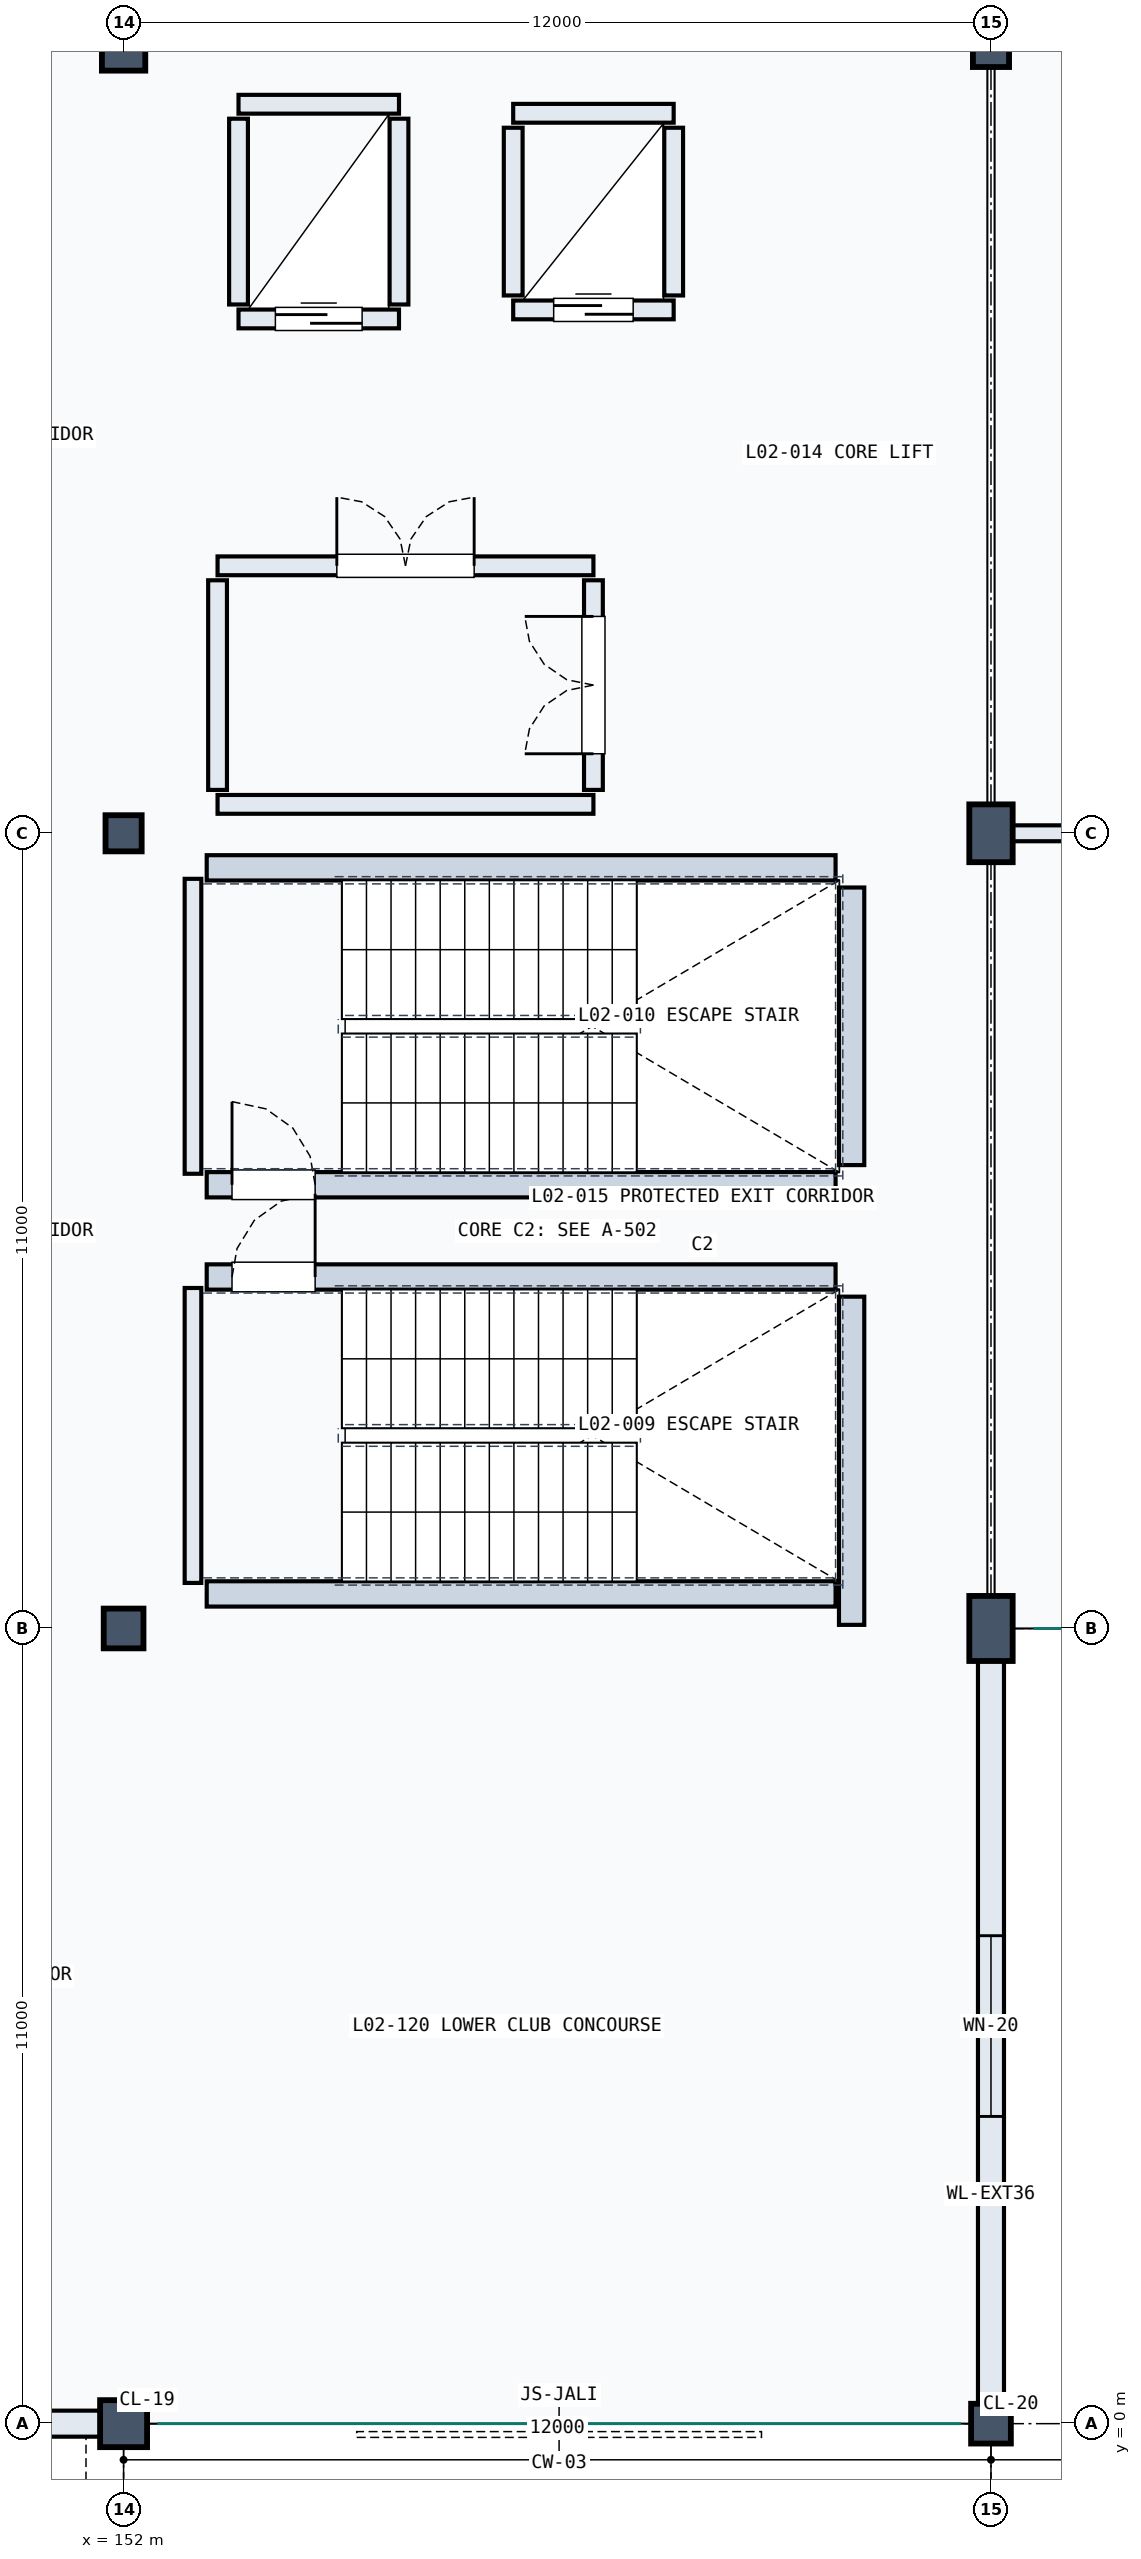
"""IFC4 building model, lengths in metres.
Left out: names, types, materials, properties, quantities, classifications, styles, units other than length and angle.
Written with IfcOpenShell. Run it as: python <this file> out.ifc"""

import sys

from ifc_helpers import new_model, si_unit, direction, frame, frame_2d, origin, origin_2d, place, context, subcontext, project, spatial, rectangle, circle, extrude, element, fill, save


model = new_model("IFC4")
c1 = context("Model", 3, precision=1e-05, world=origin(), true_north=direction((0.0, 1.0)))
c2 = subcontext(c1, "Body", "Model", "MODEL_VIEW")
j1 = project(units=[si_unit("LENGTHUNIT", "METRE"), si_unit("PLANEANGLEUNIT", "RADIAN")], contexts=[c1])
p1 = place(None, origin())
s1 = spatial("IfcSite", under=j1, at=p1, CompositionType="ELEMENT")
p2 = place(p1, origin())
s2 = spatial("IfcBuilding", under=s1, at=p2, CompositionType="ELEMENT")
p3 = place(p2, frame((0.0, 0.0, 10.2)))
s3 = spatial("IfcBuildingStorey", under=s2, at=p3, CompositionType="ELEMENT", Elevation=10.2)
p4 = place(p3, frame((152.0, 0.0, 0.0), z_axis=(0.0, 0.0, 1.0), x_axis=(1.0, 0.0, 0.0)))
e1 = element("IfcColumn", 1, at=p4, inside=s3, PredefinedType="COLUMN", context=c2, shape_type="SweptSolid", body=[
    extrude(circle(Radius=0.325, at=origin_2d()), origin(), (0.0, 0.0, 1.0), 4.5),
])
p5 = place(p3, frame((152.0, 11.0, 0.0), z_axis=(0.0, 0.0, 1.0), x_axis=(1.0, 0.0, 0.0)))
e2 = element("IfcColumn", 2, at=p5, inside=s3, PredefinedType="COLUMN", context=c2, shape_type="SweptSolid", body=[
    extrude(rectangle(XDim=0.55, YDim=0.55, at=origin_2d()), origin(), (0.0, 0.0, 1.0), 4.5),
])
p6 = place(p3, frame((152.0, 22.0, 0.0), z_axis=(0.0, 0.0, 1.0), x_axis=(1.0, 0.0, 0.0)))
e3 = element("IfcColumn", 3, at=p6, inside=s3, PredefinedType="COLUMN", context=c2, shape_type="SweptSolid", body=[
    extrude(rectangle(XDim=0.5, YDim=0.5, at=origin_2d()), origin(), (0.0, 0.0, 1.0), 4.5),
])
p7 = place(p3, frame((152.0, 33.0, 0.0), z_axis=(0.0, 0.0, 1.0), x_axis=(1.0, 0.0, 0.0)))
e4 = element("IfcColumn", 4, at=p7, inside=s3, PredefinedType="COLUMN", context=c2, shape_type="SweptSolid", body=[
    extrude(rectangle(XDim=0.6, YDim=0.9, at=origin_2d()), origin(), (0.0, 0.0, 1.0), 4.5),
])
p8 = place(p3, frame((164.0, 0.0, 0.0), z_axis=(0.0, 0.0, 1.0), x_axis=(1.0, 0.0, 0.0)))
e5 = element("IfcColumn", 5, at=p8, inside=s3, PredefinedType="COLUMN", context=c2, shape_type="SweptSolid", body=[
    extrude(circle(Radius=0.275, at=origin_2d()), origin(), (0.0, 0.0, 1.0), 4.5),
])
p9 = place(p3, frame((164.0, 11.0, 0.0), z_axis=(0.0, 0.0, 1.0), x_axis=(1.0, 0.0, 0.0)))
e6 = element("IfcColumn", 6, at=p9, inside=s3, PredefinedType="COLUMN", context=c2, shape_type="SweptSolid", body=[
    extrude(rectangle(XDim=0.6, YDim=0.9, at=origin_2d()), origin(), (0.0, 0.0, 1.0), 4.5),
])
p10 = place(p3, frame((164.0, 22.0, 0.0), z_axis=(0.0, 0.0, 1.0), x_axis=(1.0, 0.0, 0.0)))
e7 = element("IfcColumn", 7, at=p10, inside=s3, PredefinedType="COLUMN", context=c2, shape_type="SweptSolid", body=[
    extrude(rectangle(XDim=0.6, YDim=0.8, at=origin_2d()), origin(), (0.0, 0.0, 1.0), 4.5),
])
p11 = place(p3, frame((164.0, 33.0, 0.0), z_axis=(0.0, 0.0, 1.0), x_axis=(1.0, 0.0, 0.0)))
e8 = element("IfcColumn", 8, at=p11, inside=s3, PredefinedType="COLUMN", context=c2, shape_type="SweptSolid", body=[
    extrude(rectangle(XDim=0.5, YDim=0.8, at=origin_2d()), origin(), (0.0, 0.0, 1.0), 4.5),
])
p12 = place(p3, frame((140.22, 0.0, 0.0), z_axis=(0.0, 0.0, 1.0), x_axis=(1.0, 0.0, 0.0)))
e9 = element("IfcWall", 9, at=p12, inside=s3, PredefinedType="SOLIDWALL", context=c2, shape_type="SweptSolid", body=[
    extrude(rectangle(XDim=11.56, YDim=0.36, at=frame_2d((5.78, 0.0))), origin(), (0.0, 0.0, 1.0), 3.405),
])
p13 = place(p12, frame((4.08, 0.0, 0.9)))
e10 = element("IfcOpeningElement", 10, at=p13, cuts=e9, PredefinedType="OPENING", context=c2, shape_type="SweptSolid", body=[
    extrude(rectangle(XDim=3.4, YDim=1.75, at=frame_2d((1.7, 0.875))), frame((0.0, 0.19, 0.0), z_axis=(0.0, -1.0, 0.0), x_axis=(1.0, 0.0, 0.0)), (0.0, 0.0, 1.0), 0.38),
])
p14 = place(p3, frame((164.0, 0.22, 0.0), z_axis=(0.0, 0.0, 1.0), x_axis=(0.0, 1.0, 0.0)))
e11 = element("IfcWall", 11, at=p14, inside=s3, PredefinedType="SOLIDWALL", context=c2, shape_type="SweptSolid", body=[
    extrude(rectangle(XDim=10.56, YDim=0.36, at=frame_2d((5.28, 0.0))), origin(), (0.0, 0.0, 1.0), 3.405),
])
p15 = place(p14, frame((4.03, 0.0, 1.0)))
e12 = element("IfcOpeningElement", 12, at=p15, cuts=e11, PredefinedType="OPENING", context=c2, shape_type="SweptSolid", body=[
    extrude(rectangle(XDim=2.5, YDim=1.35, at=frame_2d((1.25, 0.675))), frame((0.0, 0.19, 0.0), z_axis=(0.0, -1.0, 0.0), x_axis=(1.0, 0.0, 0.0)), (0.0, 0.0, 1.0), 0.38),
])
p16 = place(p3, frame((152.96, 11.63, 0.0), z_axis=(0.0, 0.0, 1.0), x_axis=(0.0, 1.0, 0.0)))
e13 = element("IfcWall", 13, at=p16, inside=s3, PredefinedType="SOLIDWALL", context=c2, shape_type="SweptSolid", body=[
    extrude(rectangle(XDim=4.08, YDim=0.23, at=frame_2d((2.04, 0.0))), origin(), (0.0, 0.0, 1.0), 4.14),
])
p17 = place(p3, frame((162.072, 11.05, 0.0), z_axis=(0.0, 0.0, 1.0), x_axis=(0.0, 1.0, 0.0)))
e14 = element("IfcWall", 14, at=p17, inside=s3, PredefinedType="SOLIDWALL", context=c2, shape_type="SweptSolid", body=[
    extrude(rectangle(XDim=4.54, YDim=0.35, at=frame_2d((2.27, 0.0))), origin(), (0.0, 0.0, 1.0), 4.14),
])
p18 = place(p3, frame((153.15, 11.478, 0.0), z_axis=(0.0, 0.0, 1.0), x_axis=(1.0, 0.0, 0.0)))
e15 = element("IfcWall", 15, at=p18, inside=s3, PredefinedType="SOLIDWALL", context=c2, shape_type="SweptSolid", body=[
    extrude(rectangle(XDim=8.7, YDim=0.35, at=frame_2d((4.35, 0.0))), origin(), (0.0, 0.0, 1.0), 4.14),
])
p19 = place(p3, frame((153.15, 15.862, 0.0), z_axis=(0.0, 0.0, 1.0), x_axis=(1.0, 0.0, 0.0)))
e16 = element("IfcWall", 16, at=p19, inside=s3, PredefinedType="SOLIDWALL", context=c2, shape_type="SweptSolid", body=[
    extrude(rectangle(XDim=8.7, YDim=0.35, at=frame_2d((4.35, 0.0))), origin(), (0.0, 0.0, 1.0), 4.14),
])
p20 = place(p19, frame((0.35, 0.0, 0.0)))
e17 = element("IfcOpeningElement", 17, at=p20, cuts=e16, PredefinedType="OPENING", context=c2, shape_type="SweptSolid", body=[
    extrude(rectangle(XDim=1.15, YDim=2.2, at=frame_2d((0.575, 1.1))), frame((0.0, 0.185, 0.0), z_axis=(0.0, -1.0, 0.0), x_axis=(1.0, 0.0, 0.0)), (0.0, 0.0, 1.0), 0.37),
])
p21 = place(p3, frame((152.96, 17.29, 0.0), z_axis=(0.0, 0.0, 1.0), x_axis=(0.0, 1.0, 0.0)))
e18 = element("IfcWall", 18, at=p21, inside=s3, PredefinedType="SOLIDWALL", context=c2, shape_type="SweptSolid", body=[
    extrude(rectangle(XDim=4.08, YDim=0.23, at=frame_2d((2.04, 0.0))), origin(), (0.0, 0.0, 1.0), 4.14),
])
p22 = place(p3, frame((162.072, 17.41, 0.0), z_axis=(0.0, 0.0, 1.0), x_axis=(0.0, 1.0, 0.0)))
e19 = element("IfcWall", 19, at=p22, inside=s3, PredefinedType="SOLIDWALL", context=c2, shape_type="SweptSolid", body=[
    extrude(rectangle(XDim=3.84, YDim=0.35, at=frame_2d((1.92, 0.0))), origin(), (0.0, 0.0, 1.0), 4.14),
])
p23 = place(p3, frame((153.15, 17.138, 0.0), z_axis=(0.0, 0.0, 1.0), x_axis=(1.0, 0.0, 0.0)))
e20 = element("IfcWall", 20, at=p23, inside=s3, PredefinedType="SOLIDWALL", context=c2, shape_type="SweptSolid", body=[
    extrude(rectangle(XDim=8.7, YDim=0.35, at=frame_2d((4.35, 0.0))), origin(), (0.0, 0.0, 1.0), 4.14),
])
p24 = place(p23, frame((0.35, 0.0, 0.0)))
e21 = element("IfcOpeningElement", 21, at=p24, cuts=e20, PredefinedType="OPENING", context=c2, shape_type="SweptSolid", body=[
    extrude(rectangle(XDim=1.15, YDim=2.2, at=frame_2d((0.575, 1.1))), frame((0.0, 0.185, 0.0), z_axis=(0.0, -1.0, 0.0), x_axis=(1.0, 0.0, 0.0)), (0.0, 0.0, 1.0), 0.37),
])
p25 = place(p3, frame((153.15, 21.522, 0.0), z_axis=(0.0, 0.0, 1.0), x_axis=(1.0, 0.0, 0.0)))
e22 = element("IfcWall", 22, at=p25, inside=s3, PredefinedType="SOLIDWALL", context=c2, shape_type="SweptSolid", body=[
    extrude(rectangle(XDim=8.7, YDim=0.35, at=frame_2d((4.35, 0.0))), origin(), (0.0, 0.0, 1.0), 4.14),
])
p26 = place(p3, frame((153.59, 29.115, 0.0), z_axis=(0.0, 0.0, 1.0), x_axis=(1.0, 0.0, 0.0)))
e23 = element("IfcWall", 23, at=p26, inside=s3, PredefinedType="SOLIDWALL", context=c2, shape_type="SweptSolid", body=[
    extrude(rectangle(XDim=2.22, YDim=0.26, at=frame_2d((1.11, 0.0))), origin(), (0.0, 0.0, 1.0), 4.14),
])
p27 = place(p26, frame((0.51, 0.0, 0.0)))
e24 = element("IfcOpeningElement", 24, at=p27, cuts=e23, PredefinedType="OPENING", context=c2, shape_type="SweptSolid", body=[
    extrude(rectangle(XDim=1.2, YDim=2.2, at=frame_2d((0.6, 1.1))), frame((0.0, 0.14, 0.0), z_axis=(0.0, -1.0, 0.0), x_axis=(1.0, 0.0, 0.0)), (0.0, 0.0, 1.0), 0.28),
])
p28 = place(p3, frame((153.59, 32.085, 0.0), z_axis=(0.0, 0.0, 1.0), x_axis=(1.0, 0.0, 0.0)))
e25 = element("IfcWall", 25, at=p28, inside=s3, PredefinedType="SOLIDWALL", context=c2, shape_type="SweptSolid", body=[
    extrude(rectangle(XDim=2.22, YDim=0.26, at=frame_2d((1.11, 0.0))), origin(), (0.0, 0.0, 1.0), 4.14),
])
for number, where, z_axis, x_axis in (
    (26, (153.59, 29.315, 0.0), (0.0, 0.0, 1.0), (0.0, 1.0, 0.0)),
    (27, (155.81, 29.315, 0.0), (0.0, 0.0, 1.0), (0.0, 1.0, 0.0)),
):
    element("IfcWall", number, at=place(p3, frame(where, z_axis=z_axis, x_axis=x_axis)), inside=s3, PredefinedType="SOLIDWALL", context=c2, shape_type="SweptSolid", body=[
        extrude(rectangle(XDim=2.57, YDim=0.26, at=frame_2d((1.285, 0.0))), origin(), (0.0, 0.0, 1.0), 4.14),
    ])
p29 = place(p3, frame((157.39, 29.24, 0.0), z_axis=(0.0, 0.0, 1.0), x_axis=(1.0, 0.0, 0.0)))
e28 = element("IfcWall", 28, at=p29, inside=s3, PredefinedType="SOLIDWALL", context=c2, shape_type="SweptSolid", body=[
    extrude(rectangle(XDim=2.22, YDim=0.26, at=frame_2d((1.11, 0.0))), origin(), (0.0, 0.0, 1.0), 4.14),
])
p30 = place(p29, frame((0.56, 0.0, 0.0)))
e29 = element("IfcOpeningElement", 29, at=p30, cuts=e28, PredefinedType="OPENING", context=c2, shape_type="SweptSolid", body=[
    extrude(rectangle(XDim=1.1, YDim=2.15, at=frame_2d((0.55, 1.075))), frame((0.0, 0.14, 0.0), z_axis=(0.0, -1.0, 0.0), x_axis=(1.0, 0.0, 0.0)), (0.0, 0.0, 1.0), 0.28),
])
p31 = place(p3, frame((157.39, 31.96, 0.0), z_axis=(0.0, 0.0, 1.0), x_axis=(1.0, 0.0, 0.0)))
e30 = element("IfcWall", 30, at=p31, inside=s3, PredefinedType="SOLIDWALL", context=c2, shape_type="SweptSolid", body=[
    extrude(rectangle(XDim=2.22, YDim=0.26, at=frame_2d((1.11, 0.0))), origin(), (0.0, 0.0, 1.0), 4.14),
])
for number, where, z_axis, x_axis in (
    (31, (157.39, 29.44, 0.0), (0.0, 0.0, 1.0), (0.0, 1.0, 0.0)),
    (32, (159.61, 29.44, 0.0), (0.0, 0.0, 1.0), (0.0, 1.0, 0.0)),
):
    element("IfcWall", number, at=place(p3, frame(where, z_axis=z_axis, x_axis=x_axis)), inside=s3, PredefinedType="SOLIDWALL", context=c2, shape_type="SweptSolid", body=[
        extrude(rectangle(XDim=2.32, YDim=0.26, at=frame_2d((1.16, 0.0))), origin(), (0.0, 0.0, 1.0), 4.14),
    ])
p32 = place(p3, frame((153.3, 25.7, 0.0), z_axis=(0.0, 0.0, 1.0), x_axis=(1.0, 0.0, 0.0)))
e33 = element("IfcWall", 33, at=p32, inside=s3, PredefinedType="SOLIDWALL", context=c2, shape_type="SweptSolid", body=[
    extrude(rectangle(XDim=5.2, YDim=0.26, at=frame_2d((2.6, 0.0))), origin(), (0.0, 0.0, 1.0), 4.14),
])
p33 = place(p32, frame((1.65, 0.0, 0.0)))
e34 = element("IfcOpeningElement", 34, at=p33, cuts=e33, PredefinedType="OPENING", context=c2, shape_type="SweptSolid", body=[
    extrude(rectangle(XDim=1.9, YDim=2.2, at=frame_2d((0.95, 1.1))), frame((0.0, 0.14, 0.0), z_axis=(0.0, -1.0, 0.0), x_axis=(1.0, 0.0, 0.0)), (0.0, 0.0, 1.0), 0.28),
])
p34 = place(p3, frame((153.3, 22.4, 0.0), z_axis=(0.0, 0.0, 1.0), x_axis=(1.0, 0.0, 0.0)))
e35 = element("IfcWall", 35, at=p34, inside=s3, PredefinedType="SOLIDWALL", context=c2, shape_type="SweptSolid", body=[
    extrude(rectangle(XDim=5.2, YDim=0.26, at=frame_2d((2.6, 0.0))), origin(), (0.0, 0.0, 1.0), 3.478),
])
p35 = place(p3, frame((153.3, 22.6, 0.0), z_axis=(0.0, 0.0, 1.0), x_axis=(0.0, 1.0, 0.0)))
e36 = element("IfcWall", 36, at=p35, inside=s3, PredefinedType="SOLIDWALL", context=c2, shape_type="SweptSolid", body=[
    extrude(rectangle(XDim=2.9, YDim=0.26, at=frame_2d((1.45, 0.0))), origin(), (0.0, 0.0, 1.0), 4.14),
])
p36 = place(p3, frame((158.5, 22.6, 0.0), z_axis=(0.0, 0.0, 1.0), x_axis=(0.0, 1.0, 0.0)))
e37 = element("IfcWall", 37, at=p36, inside=s3, PredefinedType="SOLIDWALL", context=c2, shape_type="SweptSolid", body=[
    extrude(rectangle(XDim=2.9, YDim=0.26, at=frame_2d((1.45, 0.0))), origin(), (0.0, 0.0, 1.0), 4.14),
])
p37 = place(p36, frame((0.5, 0.0, 0.0)))
e38 = element("IfcOpeningElement", 38, at=p37, cuts=e37, PredefinedType="OPENING", context=c2, shape_type="SweptSolid", body=[
    extrude(rectangle(XDim=1.9, YDim=2.2, at=frame_2d((0.95, 1.1))), frame((0.0, 0.14, 0.0), z_axis=(0.0, -1.0, 0.0), x_axis=(1.0, 0.0, 0.0)), (0.0, 0.0, 1.0), 0.28),
])
p38 = place(p3, frame((164.22, 22.0, 0.0), z_axis=(0.0, 0.0, 1.0), x_axis=(1.0, 0.0, 0.0)))
e39 = element("IfcWall", 39, at=p38, inside=s3, PredefinedType="PARTITIONING", context=c2, shape_type="SweptSolid", body=[
    extrude(rectangle(XDim=11.56, YDim=0.22, at=frame_2d((5.78, 0.0))), origin(), (0.0, 0.0, 1.0), 3.405),
])
p39 = place(p38, frame((4.73, 0.0, 0.0)))
e40 = element("IfcOpeningElement", 40, at=p39, cuts=e39, PredefinedType="OPENING", context=c2, shape_type="SweptSolid", body=[
    extrude(rectangle(XDim=2.1, YDim=2.2, at=frame_2d((1.05, 1.1))), frame((0.0, 0.12, 0.0), z_axis=(0.0, -1.0, 0.0), x_axis=(1.0, 0.0, 0.0)), (0.0, 0.0, 1.0), 0.24),
])
p40 = place(p15, origin())
e41 = element("IfcWindow", 41, at=p40, inside=s3, PartitioningType="SINGLE_PANEL", PredefinedType="WINDOW", context=c2, shape_type="SweptSolid", body=[
    extrude(rectangle(XDim=2.5, YDim=1.35, at=frame_2d((1.25, 0.675))), frame((0.0, 0.03, 0.0), z_axis=(0.0, -1.0, 0.0), x_axis=(1.0, 0.0, 0.0)), (0.0, 0.0, 1.0), 0.06),
])
fill(e12, e41)
p41 = place(p20, origin())
e42 = element("IfcDoor", 42, at=p41, inside=s3, OperationType="SINGLE_SWING_RIGHT", PredefinedType="DOOR", context=c2, shape_type="SweptSolid", body=[
    extrude(rectangle(XDim=1.15, YDim=2.2, at=frame_2d((0.575, 1.1))), frame((0.0, 0.025, 0.0), z_axis=(0.0, -1.0, 0.0), x_axis=(1.0, 0.0, 0.0)), (0.0, 0.0, 1.0), 0.05),
])
fill(e17, e42)
p42 = place(p24, origin())
e43 = element("IfcDoor", 43, at=p42, inside=s3, OperationType="SINGLE_SWING_LEFT", PredefinedType="DOOR", context=c2, shape_type="SweptSolid", body=[
    extrude(rectangle(XDim=1.15, YDim=2.2, at=frame_2d((0.575, 1.1))), frame((0.0, 0.025, 0.0), z_axis=(0.0, -1.0, 0.0), x_axis=(1.0, 0.0, 0.0)), (0.0, 0.0, 1.0), 0.05),
])
fill(e21, e43)
p43 = place(p27, origin())
e44 = element("IfcDoor", 44, at=p43, inside=s3, OperationType="SLIDING_TO_LEFT", PredefinedType="DOOR", context=c2, shape_type="SweptSolid", body=[
    extrude(rectangle(XDim=1.2, YDim=2.2, at=frame_2d((0.6, 1.1))), frame((0.0, 0.025, 0.0), z_axis=(0.0, -1.0, 0.0), x_axis=(1.0, 0.0, 0.0)), (0.0, 0.0, 1.0), 0.05),
])
fill(e24, e44)
p44 = place(p30, origin())
e45 = element("IfcDoor", 45, at=p44, inside=s3, OperationType="SLIDING_TO_LEFT", PredefinedType="DOOR", context=c2, shape_type="SweptSolid", body=[
    extrude(rectangle(XDim=1.1, YDim=2.15, at=frame_2d((0.55, 1.075))), frame((0.0, 0.025, 0.0), z_axis=(0.0, -1.0, 0.0), x_axis=(1.0, 0.0, 0.0)), (0.0, 0.0, 1.0), 0.05),
])
fill(e29, e45)
p45 = place(p33, origin())
e46 = element("IfcDoor", 46, at=p45, inside=s3, OperationType="DOUBLE_DOOR_SINGLE_SWING", PredefinedType="DOOR", context=c2, shape_type="SweptSolid", body=[
    extrude(rectangle(XDim=1.9, YDim=2.2, at=frame_2d((0.95, 1.1))), frame((0.0, 0.025, 0.0), z_axis=(0.0, -1.0, 0.0), x_axis=(1.0, 0.0, 0.0)), (0.0, 0.0, 1.0), 0.05),
])
fill(e34, e46)
p46 = place(p37, origin())
e47 = element("IfcDoor", 47, at=p46, inside=s3, OperationType="DOUBLE_DOOR_SINGLE_SWING", PredefinedType="DOOR", context=c2, shape_type="SweptSolid", body=[
    extrude(rectangle(XDim=1.9, YDim=2.2, at=frame_2d((0.95, 1.1))), frame((0.0, 0.025, 0.0), z_axis=(0.0, -1.0, 0.0), x_axis=(1.0, 0.0, 0.0)), (0.0, 0.0, 1.0), 0.05),
])
fill(e38, e47)
save(model, sys.argv[1])
